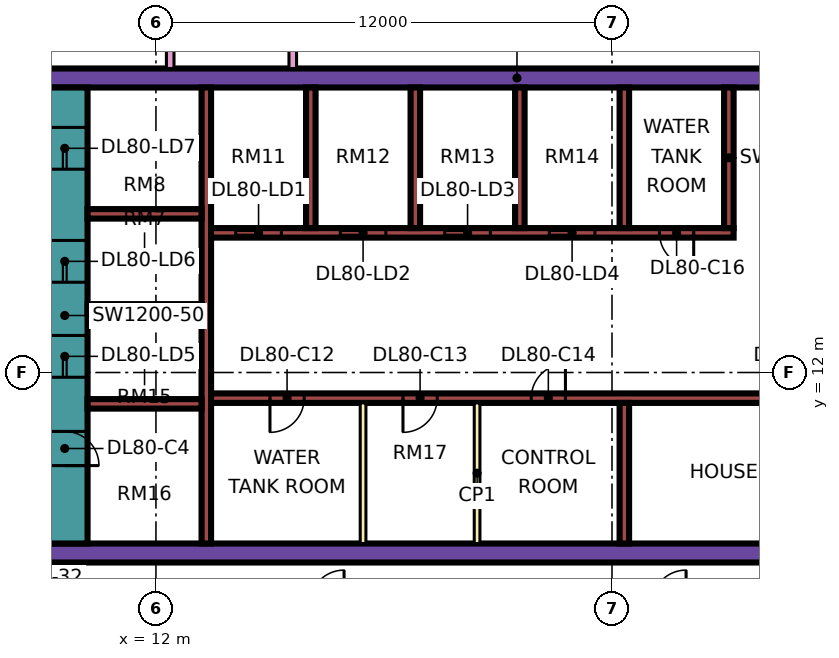
"""IFC4 building model, lengths in metres.
Left out: names, types, materials, properties, quantities, classifications, styles, units other than length and angle.
Written with IfcOpenShell. Run it as: python <this file> out.ifc"""

import sys

from ifc_helpers import new_model, si_unit, direction, frame, frame_2d, origin, place, context, subcontext, project, spatial, rectangle, extrude, element, fill, save


model = new_model("IFC4")
c1 = context("Model", 3, precision=1e-05, world=origin(), true_north=direction((0.0, 1.0)))
c2 = subcontext(c1, "Body", "Model", "MODEL_VIEW")
j1 = project(units=[si_unit("LENGTHUNIT", "METRE"), si_unit("PLANEANGLEUNIT", "RADIAN")], contexts=[c1])
p1 = place(None, origin())
s1 = spatial("IfcSite", under=j1, at=p1, CompositionType="ELEMENT")
p2 = place(p1, origin())
s2 = spatial("IfcBuilding", under=s1, at=p2, CompositionType="ELEMENT")
p3 = place(p2, frame((0.0, 0.0, 346.4)))
s3 = spatial("IfcBuildingStorey", under=s2, at=p3, CompositionType="ELEMENT", Elevation=346.4)
p4 = place(p3, frame((9.0, 7.25, 0.0), z_axis=(0.0, 0.0, 1.0), x_axis=(1.0, 0.0, 0.0)))
e1 = element("IfcWall", 1, at=p4, inside=s3, PredefinedType="SHEAR", context=c2, shape_type="SweptSolid", body=[
    extrude(rectangle(XDim=25.0, YDim=0.5, at=frame_2d((12.5, 0.0))), origin(), (0.0, 0.0, 1.0), 3.75),
])
p5 = place(p3, frame((9.0, 19.75, 0.0), z_axis=(0.0, 0.0, 1.0), x_axis=(1.0, 0.0, 0.0)))
e2 = element("IfcWall", 2, at=p5, inside=s3, PredefinedType="SHEAR", context=c2, shape_type="SweptSolid", body=[
    extrude(rectangle(XDim=25.0, YDim=0.5, at=frame_2d((12.5, 0.0))), origin(), (0.0, 0.0, 1.0), 3.75),
])
p6 = place(p5, frame((19.1, 0.0, 0.0)))
e3 = element("IfcOpeningElement", 3, at=p6, cuts=e2, PredefinedType="OPENING", context=c2, shape_type="SweptSolid", body=[
    extrude(rectangle(XDim=1.8, YDim=2.4, at=frame_2d((0.9, 1.2))), frame((0.0, 0.26, 0.0), z_axis=(0.0, -1.0, 0.0), x_axis=(1.0, 0.0, 0.0)), (0.0, 0.0, 1.0), 0.52),
])
p7 = place(p3, frame((9.6, 7.5, 0.0), z_axis=(0.0, 0.0, 1.0), x_axis=(0.0, 1.0, 0.0)))
e4 = element("IfcWall", 4, at=p7, inside=s3, PredefinedType="SHEAR", context=c2, shape_type="SweptSolid", body=[
    extrude(rectangle(XDim=12.0, YDim=1.2, at=frame_2d((6.0, 0.0))), origin(), (0.0, 0.0, 1.0), 3.75),
])
p8 = place(p7, frame((4.375, 0.0, 0.0)))
e5 = element("IfcOpeningElement", 5, at=p8, cuts=e4, PredefinedType="OPENING", context=c2, shape_type="SweptSolid", body=[
    extrude(rectangle(XDim=1.1, YDim=2.2, at=frame_2d((0.55, 1.1))), frame((0.0, 0.61, 0.0), z_axis=(0.0, -1.0, 0.0), x_axis=(1.0, 0.0, 0.0)), (0.0, 0.0, 1.0), 1.22),
])
p9 = place(p7, frame((6.875, 0.0, 0.0)))
e6 = element("IfcOpeningElement", 6, at=p9, cuts=e4, PredefinedType="OPENING", context=c2, shape_type="SweptSolid", body=[
    extrude(rectangle(XDim=1.1, YDim=2.2, at=frame_2d((0.55, 1.1))), frame((0.0, 0.61, 0.0), z_axis=(0.0, -1.0, 0.0), x_axis=(1.0, 0.0, 0.0)), (0.0, 0.0, 1.0), 1.22),
])
p10 = place(p7, frame((9.85, 0.0, 0.0)))
e7 = element("IfcOpeningElement", 7, at=p10, cuts=e4, PredefinedType="OPENING", context=c2, shape_type="SweptSolid", body=[
    extrude(rectangle(XDim=1.1, YDim=2.2, at=frame_2d((0.55, 1.1))), frame((0.0, 0.61, 0.0), z_axis=(0.0, -1.0, 0.0), x_axis=(1.0, 0.0, 0.0)), (0.0, 0.0, 1.0), 1.22),
])
p11 = place(p7, frame((2.05, 0.0, 0.0)))
e8 = element("IfcOpeningElement", 8, at=p11, cuts=e4, PredefinedType="OPENING", context=c2, shape_type="SweptSolid", body=[
    extrude(rectangle(XDim=0.9, YDim=2.1, at=frame_2d((0.45, 1.05))), frame((0.0, 0.61, 0.0), z_axis=(0.0, -1.0, 0.0), x_axis=(1.0, 0.0, 0.0)), (0.0, 0.0, 1.0), 1.22),
])
p12 = place(p3, frame((13.325, 7.5, 0.0), z_axis=(0.0, 0.0, 1.0), x_axis=(0.0, 1.0, 0.0)))
e9 = element("IfcWall", 9, at=p12, inside=s3, PredefinedType="SHEAR", context=c2, shape_type="SweptSolid", body=[
    extrude(rectangle(XDim=12.0, YDim=0.25, at=frame_2d((6.0, 0.0))), origin(), (0.0, 0.0, 1.0), 3.75),
])
p13 = place(p3, frame((13.45, 11.325, 0.0), z_axis=(0.0, 0.0, 1.0), x_axis=(1.0, 0.0, 0.0)))
e10 = element("IfcWall", 10, at=p13, inside=s3, PredefinedType="SHEAR", context=c2, shape_type="SweptSolid", body=[
    extrude(rectangle(XDim=20.05, YDim=0.25, at=frame_2d((10.025, 0.0))), origin(), (0.0, 0.0, 1.0), 3.75),
])
p14 = place(p13, frame((1.55, 0.0, 0.0)))
e11 = element("IfcOpeningElement", 11, at=p14, cuts=e10, PredefinedType="OPENING", context=c2, shape_type="SweptSolid", body=[
    extrude(rectangle(XDim=0.9, YDim=2.1, at=frame_2d((0.45, 1.05))), frame((0.0, 0.135, 0.0), z_axis=(0.0, -1.0, 0.0), x_axis=(1.0, 0.0, 0.0)), (0.0, 0.0, 1.0), 0.27),
])
p15 = place(p13, frame((5.05, 0.0, 0.0)))
e12 = element("IfcOpeningElement", 12, at=p15, cuts=e10, PredefinedType="OPENING", context=c2, shape_type="SweptSolid", body=[
    extrude(rectangle(XDim=0.9, YDim=2.1, at=frame_2d((0.45, 1.05))), frame((0.0, 0.135, 0.0), z_axis=(0.0, -1.0, 0.0), x_axis=(1.0, 0.0, 0.0)), (0.0, 0.0, 1.0), 0.27),
])
p16 = place(p13, frame((8.425, 0.0, 0.0)))
e13 = element("IfcOpeningElement", 13, at=p16, cuts=e10, PredefinedType="OPENING", context=c2, shape_type="SweptSolid", body=[
    extrude(rectangle(XDim=0.9, YDim=2.1, at=frame_2d((0.45, 1.05))), frame((0.0, 0.135, 0.0), z_axis=(0.0, -1.0, 0.0), x_axis=(1.0, 0.0, 0.0)), (0.0, 0.0, 1.0), 0.27),
])
p17 = place(p13, frame((15.075, 0.0, 0.0)))
e14 = element("IfcOpeningElement", 14, at=p17, cuts=e10, PredefinedType="OPENING", context=c2, shape_type="SweptSolid", body=[
    extrude(rectangle(XDim=0.9, YDim=2.1, at=frame_2d((0.45, 1.05))), frame((0.0, 0.135, 0.0), z_axis=(0.0, -1.0, 0.0), x_axis=(1.0, 0.0, 0.0)), (0.0, 0.0, 1.0), 0.27),
])
p18 = place(p3, frame((13.45, 15.675, 0.0), z_axis=(0.0, 0.0, 1.0), x_axis=(1.0, 0.0, 0.0)))
e15 = element("IfcWall", 15, at=p18, inside=s3, PredefinedType="SHEAR", context=c2, shape_type="SweptSolid", body=[
    extrude(rectangle(XDim=13.75, YDim=0.25, at=frame_2d((6.875, 0.0))), origin(), (0.0, 0.0, 1.0), 3.75),
])
p19 = place(p18, frame((0.65, 0.0, 0.0)))
e16 = element("IfcOpeningElement", 16, at=p19, cuts=e15, PredefinedType="OPENING", context=c2, shape_type="SweptSolid", body=[
    extrude(rectangle(XDim=1.2, YDim=2.2, at=frame_2d((0.6, 1.1))), frame((0.0, 0.135, 0.0), z_axis=(0.0, -1.0, 0.0), x_axis=(1.0, 0.0, 0.0)), (0.0, 0.0, 1.0), 0.27),
])
p20 = place(p18, frame((3.4, 0.0, 0.0)))
e17 = element("IfcOpeningElement", 17, at=p20, cuts=e15, PredefinedType="OPENING", context=c2, shape_type="SweptSolid", body=[
    extrude(rectangle(XDim=1.2, YDim=2.2, at=frame_2d((0.6, 1.1))), frame((0.0, 0.135, 0.0), z_axis=(0.0, -1.0, 0.0), x_axis=(1.0, 0.0, 0.0)), (0.0, 0.0, 1.0), 0.27),
])
p21 = place(p18, frame((6.15, 0.0, 0.0)))
e18 = element("IfcOpeningElement", 18, at=p21, cuts=e15, PredefinedType="OPENING", context=c2, shape_type="SweptSolid", body=[
    extrude(rectangle(XDim=1.2, YDim=2.2, at=frame_2d((0.6, 1.1))), frame((0.0, 0.135, 0.0), z_axis=(0.0, -1.0, 0.0), x_axis=(1.0, 0.0, 0.0)), (0.0, 0.0, 1.0), 0.27),
])
p22 = place(p18, frame((8.9, 0.0, 0.0)))
e19 = element("IfcOpeningElement", 19, at=p22, cuts=e15, PredefinedType="OPENING", context=c2, shape_type="SweptSolid", body=[
    extrude(rectangle(XDim=1.2, YDim=2.2, at=frame_2d((0.6, 1.1))), frame((0.0, 0.135, 0.0), z_axis=(0.0, -1.0, 0.0), x_axis=(1.0, 0.0, 0.0)), (0.0, 0.0, 1.0), 0.27),
])
p23 = place(p18, frame((11.8, 0.0, 0.0)))
e20 = element("IfcOpeningElement", 20, at=p23, cuts=e15, PredefinedType="OPENING", context=c2, shape_type="SweptSolid", body=[
    extrude(rectangle(XDim=0.9, YDim=2.1, at=frame_2d((0.45, 1.05))), frame((0.0, 0.135, 0.0), z_axis=(0.0, -1.0, 0.0), x_axis=(1.0, 0.0, 0.0)), (0.0, 0.0, 1.0), 0.27),
])
for number, where, z_axis, x_axis in (
    (21, (10.2, 11.175, 0.0), (0.0, 0.0, 1.0), (1.0, 0.0, 0.0)),
    (22, (10.2, 13.675, 0.0), (0.0, 0.0, 1.0), (1.0, 0.0, 0.0)),
    (23, (10.2, 16.175, 0.0), (0.0, 0.0, 1.0), (1.0, 0.0, 0.0)),
):
    element("IfcWall", number, at=place(p3, frame(where, z_axis=z_axis, x_axis=x_axis)), inside=s3, PredefinedType="SHEAR", context=c2, shape_type="SweptSolid", body=[
        extrude(rectangle(XDim=3.0, YDim=0.25, at=frame_2d((1.5, 0.0))), origin(), (0.0, 0.0, 1.0), 3.75),
    ])
for number, where, z_axis, x_axis in (
    (24, (24.325, 7.5, 0.0), (0.0, 0.0, 1.0), (0.0, 1.0, 0.0)),
    (25, (16.075, 15.8, 0.0), (0.0, 0.0, 1.0), (0.0, 1.0, 0.0)),
    (26, (18.825, 15.8, 0.0), (0.0, 0.0, 1.0), (0.0, 1.0, 0.0)),
    (27, (21.575, 15.8, 0.0), (0.0, 0.0, 1.0), (0.0, 1.0, 0.0)),
    (28, (24.325, 15.8, 0.0), (0.0, 0.0, 1.0), (0.0, 1.0, 0.0)),
    (29, (27.075, 15.8, 0.0), (0.0, 0.0, 1.0), (0.0, 1.0, 0.0)),
):
    element("IfcWall", number, at=place(p3, frame(where, z_axis=z_axis, x_axis=x_axis)), inside=s3, PredefinedType="SHEAR", context=c2, shape_type="SweptSolid", body=[
        extrude(rectangle(XDim=3.7, YDim=0.25, at=frame_2d((1.85, 0.0))), origin(), (0.0, 0.0, 1.0), 3.75),
    ])
p24 = place(p3, frame((-1.447, 12.553, 0.0), z_axis=(0.0, 0.0, 1.0), x_axis=(0.707106781187, -0.707106781187, 0.0)))
e30 = element("IfcWall", 30, at=p24, inside=s3, PredefinedType="SOLIDWALL", context=c2, shape_type="SweptSolid", body=[
    extrude(rectangle(XDim=19.799, YDim=0.15, at=frame_2d((9.899, 0.0))), origin(), (0.0, 0.0, 1.0), 3.35),
])
p25 = place(p24, frame((2.212, 0.0, 0.45)))
e31 = element("IfcOpeningElement", 31, at=p25, cuts=e30, PredefinedType="OPENING", context=c2, shape_type="SweptSolid", body=[
    extrude(rectangle(XDim=3.0, YDim=2.4, at=frame_2d((1.5, 1.2))), frame((0.0, 0.085, 0.0), z_axis=(0.0, -1.0, 0.0), x_axis=(1.0, 0.0, 0.0)), (0.0, 0.0, 1.0), 0.17),
])
p26 = place(p24, frame((10.216, 0.0, 0.45)))
e32 = element("IfcOpeningElement", 32, at=p26, cuts=e30, PredefinedType="OPENING", context=c2, shape_type="SweptSolid", body=[
    extrude(rectangle(XDim=3.0, YDim=2.4, at=frame_2d((1.5, 1.2))), frame((0.0, 0.085, 0.0), z_axis=(0.0, -1.0, 0.0), x_axis=(1.0, 0.0, 0.0)), (0.0, 0.0, 1.0), 0.17),
])
for number, where, z_axis, x_axis in (
    (33, (17.45, 7.5, 0.0), (0.0, 0.0, 1.0), (0.0, 1.0, 0.0)),
    (34, (20.45, 7.5, 0.0), (0.0, 0.0, 1.0), (0.0, 1.0, 0.0)),
):
    element("IfcWall", number, at=place(p3, frame(where, z_axis=z_axis, x_axis=x_axis)), inside=s3, PredefinedType="PARTITIONING", context=c2, shape_type="SweptSolid", body=[
        extrude(rectangle(XDim=3.7, YDim=0.15, at=frame_2d((1.85, 0.0))), origin(), (0.0, 0.0, 1.0), 3.35),
    ])
p27 = place(p3, frame((12.375, 20.0, 0.0), z_axis=(0.0, 0.0, 1.0), x_axis=(0.0, 1.0, 0.0)))
e35 = element("IfcWall", 35, at=p27, inside=s3, PredefinedType="PARTITIONING", context=c2, shape_type="SweptSolid", body=[
    extrude(rectangle(XDim=33.926, YDim=0.2, at=frame_2d((16.963, 0.0))), origin(), (0.0, 0.0, 1.0), 3.35),
])
p28 = place(p27, frame((16.95, 0.0, 0.0)))
e36 = element("IfcOpeningElement", 36, at=p28, cuts=e35, PredefinedType="OPENING", context=c2, shape_type="SweptSolid", body=[
    extrude(rectangle(XDim=1.0, YDim=2.1, at=frame_2d((0.5, 1.05))), frame((0.0, 0.11, 0.0), z_axis=(0.0, -1.0, 0.0), x_axis=(1.0, 0.0, 0.0)), (0.0, 0.0, 1.0), 0.22),
])
p29 = place(p27, frame((0.6, 0.0, 0.0)))
e37 = element("IfcOpeningElement", 37, at=p29, cuts=e35, PredefinedType="OPENING", context=c2, shape_type="SweptSolid", body=[
    extrude(rectangle(XDim=1.2, YDim=2.1, at=frame_2d((0.6, 1.05))), frame((0.0, 0.11, 0.0), z_axis=(0.0, -1.0, 0.0), x_axis=(1.0, 0.0, 0.0)), (0.0, 0.0, 1.0), 0.22),
])
p30 = place(p27, frame((14.25, 0.0, 0.0)))
e38 = element("IfcOpeningElement", 38, at=p30, cuts=e35, PredefinedType="OPENING", context=c2, shape_type="SweptSolid", body=[
    extrude(rectangle(XDim=1.0, YDim=2.1, at=frame_2d((0.5, 1.05))), frame((0.0, 0.11, 0.0), z_axis=(0.0, -1.0, 0.0), x_axis=(1.0, 0.0, 0.0)), (0.0, 0.0, 1.0), 0.22),
])
p31 = place(p3, frame((15.6, 20.0, 0.0), z_axis=(0.0, 0.0, 1.0), x_axis=(0.0, 1.0, 0.0)))
e39 = element("IfcWall", 39, at=p31, inside=s3, PredefinedType="PARTITIONING", context=c2, shape_type="SweptSolid", body=[
    extrude(rectangle(XDim=27.775, YDim=0.2, at=frame_2d((13.887, 0.0))), origin(), (0.0, 0.0, 1.0), 3.35),
])
p32 = place(p31, frame((6.7, 0.0, 0.0)))
e40 = element("IfcOpeningElement", 40, at=p32, cuts=e39, PredefinedType="OPENING", context=c2, shape_type="SweptSolid", body=[
    extrude(rectangle(XDim=1.6, YDim=2.1, at=frame_2d((0.8, 1.05))), frame((0.0, 0.11, 0.0), z_axis=(0.0, -1.0, 0.0), x_axis=(1.0, 0.0, 0.0)), (0.0, 0.0, 1.0), 0.22),
])
p33 = place(p31, frame((12.95, 0.0, 0.0)))
e41 = element("IfcOpeningElement", 41, at=p33, cuts=e39, PredefinedType="OPENING", context=c2, shape_type="SweptSolid", body=[
    extrude(rectangle(XDim=1.0, YDim=2.1, at=frame_2d((0.5, 1.05))), frame((0.0, 0.11, 0.0), z_axis=(0.0, -1.0, 0.0), x_axis=(1.0, 0.0, 0.0)), (0.0, 0.0, 1.0), 0.22),
])
p34 = place(p31, frame((16.9, 0.0, 0.0)))
e42 = element("IfcOpeningElement", 42, at=p34, cuts=e39, PredefinedType="OPENING", context=c2, shape_type="SweptSolid", body=[
    extrude(rectangle(XDim=1.0, YDim=2.1, at=frame_2d((0.5, 1.05))), frame((0.0, 0.11, 0.0), z_axis=(0.0, -1.0, 0.0), x_axis=(1.0, 0.0, 0.0)), (0.0, 0.0, 1.0), 0.22),
])
p35 = place(p31, frame((1.15, 0.0, 0.0)))
e43 = element("IfcOpeningElement", 43, at=p35, cuts=e39, PredefinedType="OPENING", context=c2, shape_type="SweptSolid", body=[
    extrude(rectangle(XDim=1.8, YDim=2.1, at=frame_2d((0.9, 1.05))), frame((0.0, 0.11, 0.0), z_axis=(0.0, -1.0, 0.0), x_axis=(1.0, 0.0, 0.0)), (0.0, 0.0, 1.0), 0.22),
])
p36 = place(p31, frame((25.9, 0.0, 0.0)))
e44 = element("IfcOpeningElement", 44, at=p36, cuts=e39, PredefinedType="OPENING", context=c2, shape_type="SweptSolid", body=[
    extrude(rectangle(XDim=1.0, YDim=2.1, at=frame_2d((0.5, 1.05))), frame((0.0, 0.11, 0.0), z_axis=(0.0, -1.0, 0.0), x_axis=(1.0, 0.0, 0.0)), (0.0, 0.0, 1.0), 0.22),
])
p37 = place(p19, origin())
e45 = element("IfcDoor", 45, at=p37, inside=s3, OperationType="DOUBLE_DOOR_SLIDING", PredefinedType="DOOR", context=c2, shape_type="SweptSolid", body=[
    extrude(rectangle(XDim=1.2, YDim=2.2, at=frame_2d((0.6, 1.1))), frame((0.0, 0.025, 0.0), z_axis=(0.0, -1.0, 0.0), x_axis=(1.0, 0.0, 0.0)), (0.0, 0.0, 1.0), 0.05),
])
fill(e16, e45)
p38 = place(p20, origin())
e46 = element("IfcDoor", 46, at=p38, inside=s3, OperationType="DOUBLE_DOOR_SLIDING", PredefinedType="DOOR", context=c2, shape_type="SweptSolid", body=[
    extrude(rectangle(XDim=1.2, YDim=2.2, at=frame_2d((0.6, 1.1))), frame((0.0, 0.025, 0.0), z_axis=(0.0, -1.0, 0.0), x_axis=(1.0, 0.0, 0.0)), (0.0, 0.0, 1.0), 0.05),
])
fill(e17, e46)
p39 = place(p21, origin())
e47 = element("IfcDoor", 47, at=p39, inside=s3, OperationType="DOUBLE_DOOR_SLIDING", PredefinedType="DOOR", context=c2, shape_type="SweptSolid", body=[
    extrude(rectangle(XDim=1.2, YDim=2.2, at=frame_2d((0.6, 1.1))), frame((0.0, 0.025, 0.0), z_axis=(0.0, -1.0, 0.0), x_axis=(1.0, 0.0, 0.0)), (0.0, 0.0, 1.0), 0.05),
])
fill(e18, e47)
p40 = place(p22, origin())
e48 = element("IfcDoor", 48, at=p40, inside=s3, OperationType="DOUBLE_DOOR_SLIDING", PredefinedType="DOOR", context=c2, shape_type="SweptSolid", body=[
    extrude(rectangle(XDim=1.2, YDim=2.2, at=frame_2d((0.6, 1.1))), frame((0.0, 0.025, 0.0), z_axis=(0.0, -1.0, 0.0), x_axis=(1.0, 0.0, 0.0)), (0.0, 0.0, 1.0), 0.05),
])
fill(e19, e48)
p41 = place(p8, origin())
e49 = element("IfcDoor", 49, at=p41, inside=s3, OperationType="DOUBLE_DOOR_SLIDING", PredefinedType="DOOR", context=c2, shape_type="SweptSolid", body=[
    extrude(rectangle(XDim=1.1, YDim=2.2, at=frame_2d((0.55, 1.1))), frame((0.0, 0.025, 0.0), z_axis=(0.0, -1.0, 0.0), x_axis=(1.0, 0.0, 0.0)), (0.0, 0.0, 1.0), 0.05),
])
fill(e5, e49)
p42 = place(p9, origin())
e50 = element("IfcDoor", 50, at=p42, inside=s3, OperationType="DOUBLE_DOOR_SLIDING", PredefinedType="DOOR", context=c2, shape_type="SweptSolid", body=[
    extrude(rectangle(XDim=1.1, YDim=2.2, at=frame_2d((0.55, 1.1))), frame((0.0, 0.025, 0.0), z_axis=(0.0, -1.0, 0.0), x_axis=(1.0, 0.0, 0.0)), (0.0, 0.0, 1.0), 0.05),
])
fill(e6, e50)
p43 = place(p10, origin())
e51 = element("IfcDoor", 51, at=p43, inside=s3, OperationType="DOUBLE_DOOR_SLIDING", PredefinedType="DOOR", context=c2, shape_type="SweptSolid", body=[
    extrude(rectangle(XDim=1.1, YDim=2.2, at=frame_2d((0.55, 1.1))), frame((0.0, 0.025, 0.0), z_axis=(0.0, -1.0, 0.0), x_axis=(1.0, 0.0, 0.0)), (0.0, 0.0, 1.0), 0.05),
])
fill(e7, e51)
p44 = place(p11, frame((0.9, 0.0, 0.0), z_axis=(0.0, 0.0, 1.0), x_axis=(-1.0, 0.0, 0.0)))
e52 = element("IfcDoor", 52, at=p44, inside=s3, OperationType="SINGLE_SWING_LEFT", PredefinedType="DOOR", context=c2, shape_type="SweptSolid", body=[
    extrude(rectangle(XDim=0.9, YDim=2.1, at=frame_2d((0.45, 1.05))), frame((0.0, 0.025, 0.0), z_axis=(0.0, -1.0, 0.0), x_axis=(1.0, 0.0, 0.0)), (0.0, 0.0, 1.0), 0.05),
])
fill(e8, e52)
p45 = place(p14, frame((0.9, 0.0, 0.0), z_axis=(0.0, 0.0, 1.0), x_axis=(-1.0, 0.0, 0.0)))
e53 = element("IfcDoor", 53, at=p45, inside=s3, OperationType="SINGLE_SWING_LEFT", PredefinedType="DOOR", context=c2, shape_type="SweptSolid", body=[
    extrude(rectangle(XDim=0.9, YDim=2.1, at=frame_2d((0.45, 1.05))), frame((0.0, 0.025, 0.0), z_axis=(0.0, -1.0, 0.0), x_axis=(1.0, 0.0, 0.0)), (0.0, 0.0, 1.0), 0.05),
])
fill(e11, e53)
p46 = place(p15, frame((0.9, 0.0, 0.0), z_axis=(0.0, 0.0, 1.0), x_axis=(-1.0, 0.0, 0.0)))
e54 = element("IfcDoor", 54, at=p46, inside=s3, OperationType="SINGLE_SWING_LEFT", PredefinedType="DOOR", context=c2, shape_type="SweptSolid", body=[
    extrude(rectangle(XDim=0.9, YDim=2.1, at=frame_2d((0.45, 1.05))), frame((0.0, 0.025, 0.0), z_axis=(0.0, -1.0, 0.0), x_axis=(1.0, 0.0, 0.0)), (0.0, 0.0, 1.0), 0.05),
])
fill(e12, e54)
p47 = place(p16, frame((0.9, 0.0, 0.0), z_axis=(0.0, 0.0, 1.0), x_axis=(-1.0, 0.0, 0.0)))
e55 = element("IfcDoor", 55, at=p47, inside=s3, OperationType="SINGLE_SWING_RIGHT", PredefinedType="DOOR", context=c2, shape_type="SweptSolid", body=[
    extrude(rectangle(XDim=0.9, YDim=2.1, at=frame_2d((0.45, 1.05))), frame((0.0, 0.025, 0.0), z_axis=(0.0, -1.0, 0.0), x_axis=(1.0, 0.0, 0.0)), (0.0, 0.0, 1.0), 0.05),
])
fill(e13, e55)
p48 = place(p23, origin())
e56 = element("IfcDoor", 56, at=p48, inside=s3, OperationType="SINGLE_SWING_RIGHT", PredefinedType="DOOR", context=c2, shape_type="SweptSolid", body=[
    extrude(rectangle(XDim=0.9, YDim=2.1, at=frame_2d((0.45, 1.05))), frame((0.0, 0.025, 0.0), z_axis=(0.0, -1.0, 0.0), x_axis=(1.0, 0.0, 0.0)), (0.0, 0.0, 1.0), 0.05),
])
fill(e20, e56)
save(model, sys.argv[1])
